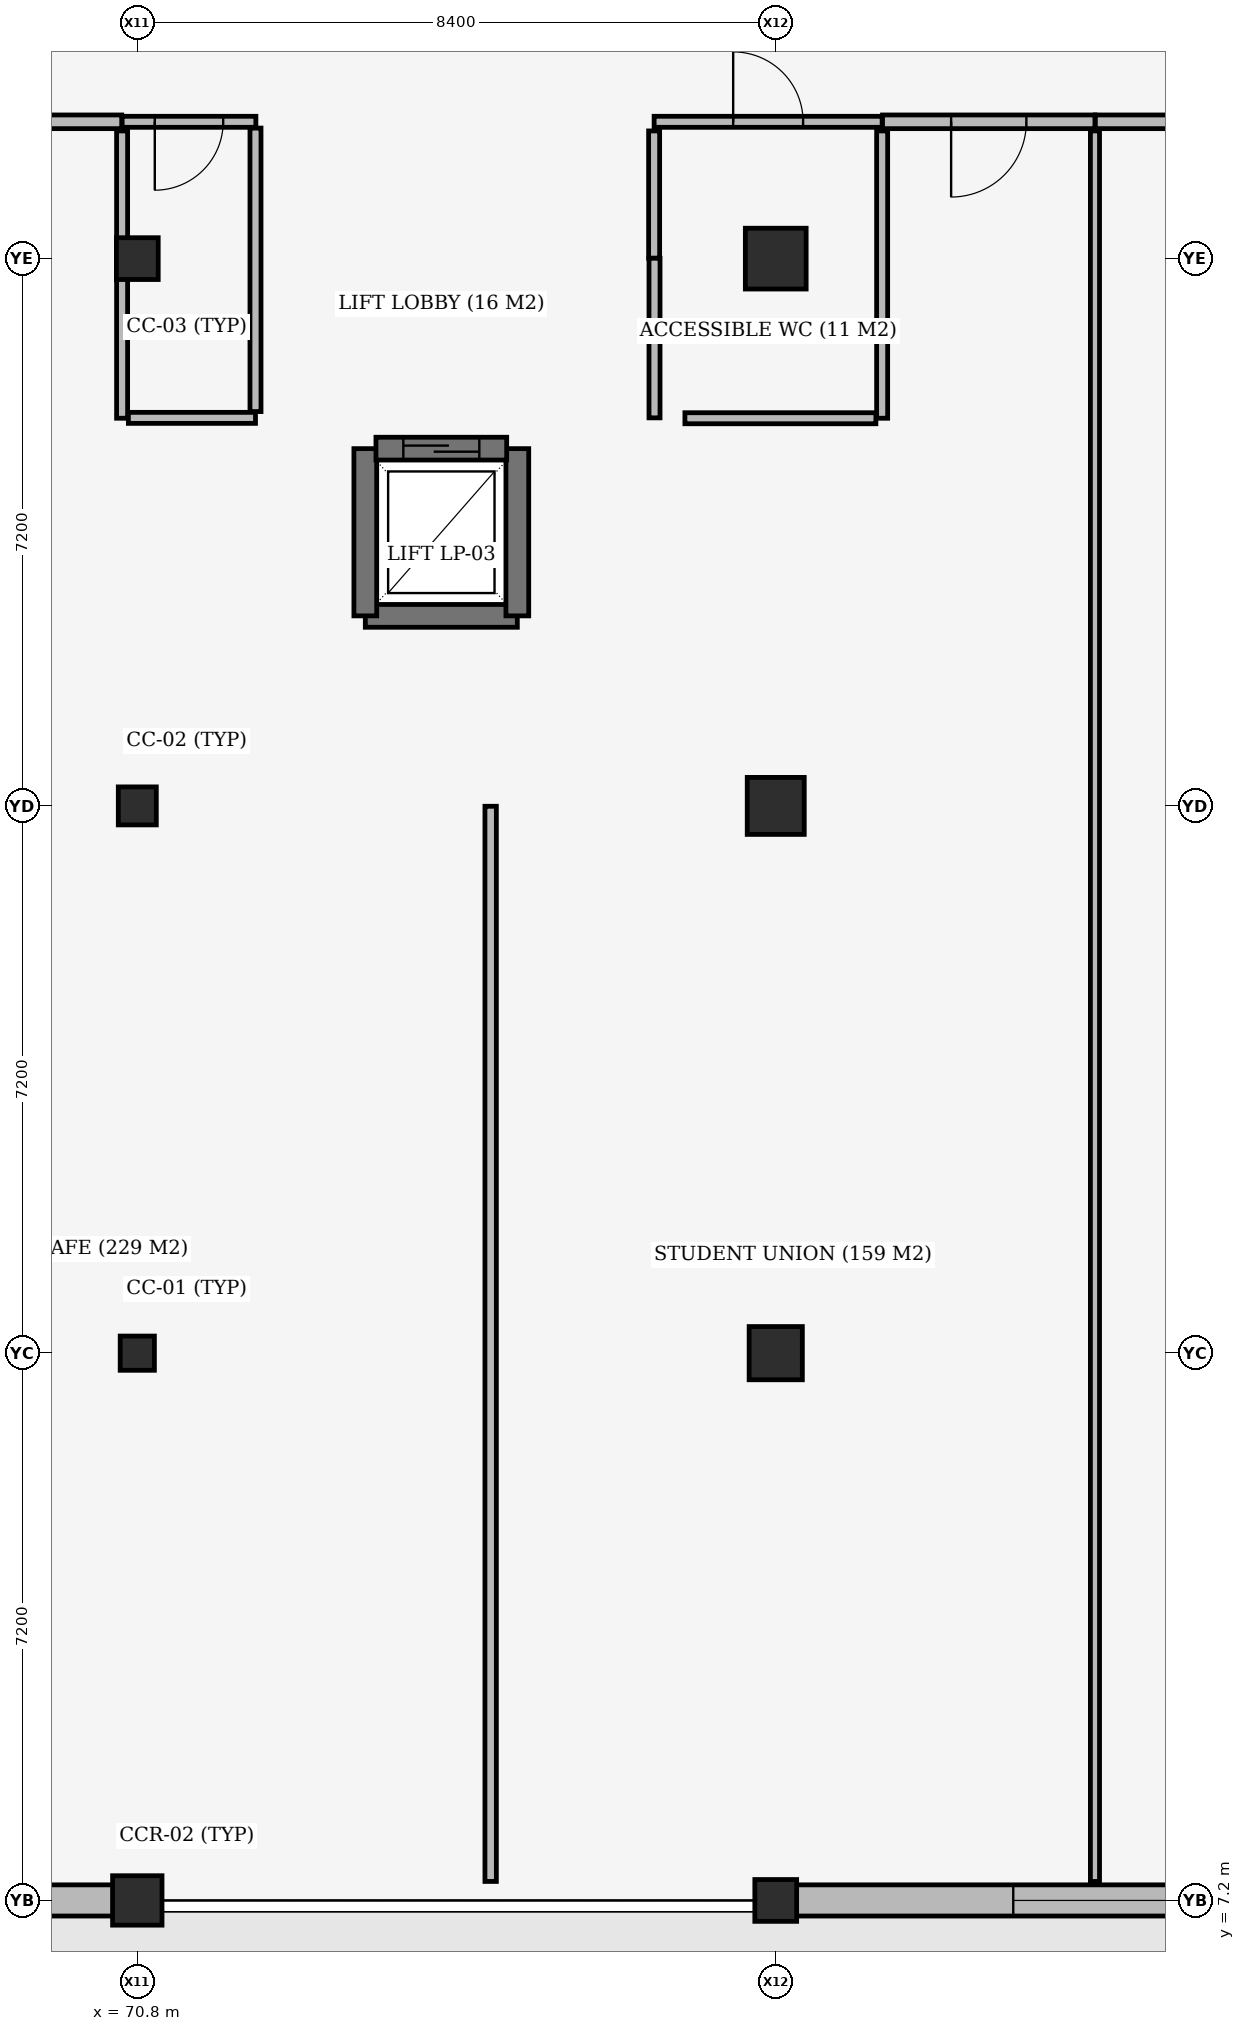
"""IFC4 building model, lengths in metres.
Left out: names, types, materials, properties, quantities, classifications, styles, units other than length and angle.
Written with IfcOpenShell. Run it as: python <this file> out.ifc"""

import sys

from ifc_helpers import new_model, si_unit, direction, frame, frame_2d, origin, origin_2d, place, context, subcontext, project, spatial, rectangle, circle, extrude, element, fill, save


model = new_model("IFC4")
c1 = context("Model", 3, precision=1e-05, world=origin(), true_north=direction((0.0, 1.0)))
c2 = subcontext(c1, "Body", "Model", "MODEL_VIEW")
j1 = project(units=[si_unit("LENGTHUNIT", "METRE"), si_unit("PLANEANGLEUNIT", "RADIAN")], contexts=[c1])
p1 = place(None, origin())
s1 = spatial("IfcSite", under=j1, at=p1, CompositionType="ELEMENT")
p2 = place(p1, origin())
s2 = spatial("IfcBuilding", under=s1, at=p2, CompositionType="ELEMENT")
p3 = place(p2, origin())
s3 = spatial("IfcBuildingStorey", under=s2, at=p3, CompositionType="ELEMENT", Elevation=0.0)
p4 = place(p3, frame((70.8, 7.2, 0.0), z_axis=(0.0, 0.0, 1.0), x_axis=(1.0, 0.0, 0.0)))
e1 = element("IfcColumn", 1, at=p4, inside=s3, PredefinedType="COLUMN", context=c2, shape_type="SweptSolid", body=[
    extrude(circle(Radius=0.325, at=origin_2d()), origin(), (0.0, 0.0, 1.0), 5.1),
])
p5 = place(p3, frame((70.8, 14.4, 0.0), z_axis=(0.0, 0.0, 1.0), x_axis=(1.0, 0.0, 0.0)))
e2 = element("IfcColumn", 2, at=p5, inside=s3, PredefinedType="COLUMN", context=c2, shape_type="SweptSolid", body=[
    extrude(rectangle(XDim=0.45, YDim=0.45, at=origin_2d()), origin(), (0.0, 0.0, 1.0), 5.1),
])
p6 = place(p3, frame((70.8, 21.6, 0.0), z_axis=(0.0, 0.0, 1.0), x_axis=(1.0, 0.0, 0.0)))
e3 = element("IfcColumn", 3, at=p6, inside=s3, PredefinedType="COLUMN", context=c2, shape_type="SweptSolid", body=[
    extrude(rectangle(XDim=0.5, YDim=0.5, at=origin_2d()), origin(), (0.0, 0.0, 1.0), 5.1),
])
p7 = place(p3, frame((70.8, 28.8, 0.0), z_axis=(0.0, 0.0, 1.0), x_axis=(1.0, 0.0, 0.0)))
e4 = element("IfcColumn", 4, at=p7, inside=s3, PredefinedType="COLUMN", context=c2, shape_type="SweptSolid", body=[
    extrude(rectangle(XDim=0.55, YDim=0.55, at=origin_2d()), origin(), (0.0, 0.0, 1.0), 5.1),
])
p8 = place(p3, frame((79.2, 7.2, 0.0), z_axis=(0.0, 0.0, 1.0), x_axis=(1.0, 0.0, 0.0)))
e5 = element("IfcColumn", 5, at=p8, inside=s3, PredefinedType="COLUMN", context=c2, shape_type="SweptSolid", body=[
    extrude(circle(Radius=0.275, at=origin_2d()), origin(), (0.0, 0.0, 1.0), 5.1),
])
p9 = place(p3, frame((79.2, 14.4, 0.0), z_axis=(0.0, 0.0, 1.0), x_axis=(1.0, 0.0, 0.0)))
e6 = element("IfcColumn", 6, at=p9, inside=s3, PredefinedType="COLUMN", context=c2, shape_type="SweptSolid", body=[
    extrude(rectangle(XDim=0.7, YDim=0.7, at=origin_2d()), origin(), (0.0, 0.0, 1.0), 5.1),
])
p10 = place(p3, frame((79.2, 21.6, 0.0), z_axis=(0.0, 0.0, 1.0), x_axis=(1.0, 0.0, 0.0)))
e7 = element("IfcColumn", 7, at=p10, inside=s3, PredefinedType="COLUMN", context=c2, shape_type="SweptSolid", body=[
    extrude(rectangle(XDim=0.75, YDim=0.75, at=origin_2d()), origin(), (0.0, 0.0, 1.0), 5.1),
])
p11 = place(p3, frame((79.2, 28.8, 0.0), z_axis=(0.0, 0.0, 1.0), x_axis=(1.0, 0.0, 0.0)))
e8 = element("IfcColumn", 8, at=p11, inside=s3, PredefinedType="COLUMN", context=c2, shape_type="SweptSolid", body=[
    extrude(rectangle(XDim=0.8, YDim=0.8, at=origin_2d()), origin(), (0.0, 0.0, 1.0), 5.1),
])
p12 = place(p3, frame((73.8, 24.1, 0.0), z_axis=(0.0, 0.0, 1.0), x_axis=(1.0, 0.0, 0.0)))
e9 = element("IfcWall", 9, at=p12, inside=s3, PredefinedType="SHEAR", context=c2, shape_type="SweptSolid", body=[
    extrude(rectangle(XDim=2.0, YDim=0.3, at=frame_2d((1.0, 0.0))), origin(), (0.0, 0.0, 1.0), 5.1),
])
for number, where, z_axis, x_axis in (
    (10, (73.8, 26.3, 0.0), (0.0, 0.0, 1.0), (0.0, -1.0, 0.0)),
    (11, (75.8, 24.1, 0.0), (0.0, 0.0, 1.0), (0.0, 1.0, 0.0)),
):
    element("IfcWall", number, at=place(p3, frame(where, z_axis=z_axis, x_axis=x_axis)), inside=s3, PredefinedType="SHEAR", context=c2, shape_type="SweptSolid", body=[
        extrude(rectangle(XDim=2.2, YDim=0.3, at=frame_2d((1.1, 0.0))), origin(), (0.0, 0.0, 1.0), 5.1),
    ])
p13 = place(p3, frame((70.483, 7.2, 0.0), z_axis=(0.0, 0.0, 1.0), x_axis=(-1.0, 0.0, 0.0)))
e12 = element("IfcWall", 12, at=p13, inside=s3, PredefinedType="STANDARD", context=c2, shape_type="SweptSolid", body=[
    extrude(rectangle(XDim=7.816, YDim=0.41, at=frame_2d((3.908, 0.0))), origin(), (0.0, 0.0, 1.0), 4.4),
])
p14 = place(p13, frame((2.808, 0.0, 0.0)))
e13 = element("IfcOpeningElement", 13, at=p14, cuts=e12, PredefinedType="OPENING", context=c2, shape_type="SweptSolid", body=[
    extrude(rectangle(XDim=2.2, YDim=2.5, at=frame_2d((1.1, 1.25))), frame((0.0, 0.215, 0.0), z_axis=(0.0, -1.0, 0.0), x_axis=(1.0, 0.0, 0.0)), (0.0, 0.0, 1.0), 0.43),
])
p15 = place(p3, frame((87.283, 7.2, 0.0), z_axis=(0.0, 0.0, 1.0), x_axis=(-1.0, 0.0, 0.0)))
e14 = element("IfcWall", 14, at=p15, inside=s3, PredefinedType="STANDARD", context=c2, shape_type="SweptSolid", body=[
    extrude(rectangle(XDim=7.816, YDim=0.41, at=frame_2d((3.908, 0.0))), origin(), (0.0, 0.0, 1.0), 4.3),
])
p16 = place(p15, frame((2.858, 0.0, 0.8)))
e15 = element("IfcOpeningElement", 15, at=p16, cuts=e14, PredefinedType="OPENING", context=c2, shape_type="SweptSolid", body=[
    extrude(rectangle(XDim=2.1, YDim=3.0, at=frame_2d((1.05, 1.5))), frame((0.0, 0.215, 0.0), z_axis=(0.0, -1.0, 0.0), x_axis=(1.0, 0.0, 0.0)), (0.0, 0.0, 1.0), 0.43),
])
p17 = place(p3, frame((73.94, 26.3, 0.0), z_axis=(0.0, 0.0, 1.0), x_axis=(1.0, 0.0, 0.0)))
e16 = element("IfcWall", 16, at=p17, inside=s3, PredefinedType="SHEAR", context=c2, shape_type="SweptSolid", body=[
    extrude(rectangle(XDim=1.72, YDim=0.3, at=frame_2d((0.86, 0.0))), origin(), (0.0, 0.0, 1.0), 5.1),
])
p18 = place(p17, frame((0.36, 0.0, 0.0)))
e17 = element("IfcOpeningElement", 17, at=p18, cuts=e16, PredefinedType="OPENING", context=c2, shape_type="SweptSolid", body=[
    extrude(rectangle(XDim=1.0, YDim=2.1, at=frame_2d((0.5, 1.05))), frame((0.0, 0.16, 0.0), z_axis=(0.0, -1.0, 0.0), x_axis=(1.0, 0.0, 0.0)), (0.0, 0.0, 1.0), 0.32),
])
p19 = place(p3, frame((70.6, 30.6, 0.0), z_axis=(0.0, 0.0, 1.0), x_axis=(1.0, 0.0, 0.0)))
e18 = element("IfcWall", 18, at=p19, inside=s3, PredefinedType="PLUMBINGWALL", context=c2, shape_type="SweptSolid", body=[
    extrude(rectangle(XDim=1.76, YDim=0.145, at=frame_2d((0.88, 0.0))), origin(), (0.0, 0.0, 1.0), 4.5),
])
p20 = place(p19, frame((0.43, 0.0, 0.0)))
e19 = element("IfcOpeningElement", 19, at=p20, cuts=e18, PredefinedType="OPENING", context=c2, shape_type="SweptSolid", body=[
    extrude(rectangle(XDim=0.9, YDim=2.1, at=frame_2d((0.45, 1.05))), frame((0.0, 0.083, 0.0), z_axis=(0.0, -1.0, 0.0), x_axis=(1.0, 0.0, 0.0)), (0.0, 0.0, 1.0), 0.165),
])
p21 = place(p3, frame((70.6, 26.7, 0.0), z_axis=(0.0, 0.0, 1.0), x_axis=(0.0, 1.0, 0.0)))
e20 = element("IfcWall", 20, at=p21, inside=s3, PredefinedType="PLUMBINGWALL", context=c2, shape_type="SweptSolid", body=[
    extrude(rectangle(XDim=3.78, YDim=0.145, at=frame_2d((1.89, 0.0))), origin(), (0.0, 0.0, 1.0), 4.3),
])
p22 = place(p3, frame((77.6, 30.6, 0.0), z_axis=(0.0, 0.0, 1.0), x_axis=(1.0, 0.0, 0.0)))
e21 = element("IfcWall", 21, at=p22, inside=s3, PredefinedType="PLUMBINGWALL", context=c2, shape_type="SweptSolid", body=[
    extrude(rectangle(XDim=3.0, YDim=0.145, at=frame_2d((1.5, 0.0))), origin(), (0.0, 0.0, 1.0), 4.3),
])
p23 = place(p22, frame((1.04, 0.0, 0.0)))
e22 = element("IfcOpeningElement", 22, at=p23, cuts=e21, PredefinedType="OPENING", context=c2, shape_type="SweptSolid", body=[
    extrude(rectangle(XDim=0.92, YDim=2.1, at=frame_2d((0.46, 1.05))), frame((0.0, 0.083, 0.0), z_axis=(0.0, -1.0, 0.0), x_axis=(1.0, 0.0, 0.0)), (0.0, 0.0, 1.0), 0.165),
])
p24 = place(p3, frame((77.6, 28.805, 0.0), z_axis=(0.0, 0.0, 1.0), x_axis=(0.0, 1.0, 0.0)))
e23 = element("IfcWall", 23, at=p24, inside=s3, PredefinedType="PLUMBINGWALL", context=c2, shape_type="SweptSolid", body=[
    extrude(rectangle(XDim=1.675, YDim=0.145, at=frame_2d((0.837, 0.0))), origin(), (0.0, 0.0, 1.0), 4.35),
])
p25 = place(p3, frame((80.6, 26.7, 0.0), z_axis=(0.0, 0.0, 1.0), x_axis=(0.0, 1.0, 0.0)))
e24 = element("IfcWall", 24, at=p25, inside=s3, PredefinedType="PLUMBINGWALL", context=c2, shape_type="SweptSolid", body=[
    extrude(rectangle(XDim=3.78, YDim=0.145, at=frame_2d((1.89, 0.0))), origin(), (0.0, 0.0, 1.0), 4.3),
])
p26 = place(p3, frame((78.005, 26.7, 0.0), z_axis=(0.0, 0.0, 1.0), x_axis=(1.0, 0.0, 0.0)))
e25 = element("IfcWall", 25, at=p26, inside=s3, PredefinedType="PLUMBINGWALL", context=c2, shape_type="SweptSolid", body=[
    extrude(rectangle(XDim=2.513, YDim=0.145, at=frame_2d((1.256, 0.0))), origin(), (0.0, 0.0, 1.0), 4.35),
])
p27 = place(p3, frame((64.005, 30.6, 0.0), z_axis=(0.0, 0.0, 1.0), x_axis=(1.0, 0.0, 0.0)))
e26 = element("IfcWall", 26, at=p27, inside=s3, PredefinedType="PARTITIONING", context=c2, shape_type="SweptSolid", body=[
    extrude(rectangle(XDim=6.59, YDim=0.18, at=frame_2d((3.295, 0.0))), origin(), (0.0, 0.0, 1.0), 4.65),
])
p28 = place(p27, frame((2.805, 0.0, 0.0)))
e27 = element("IfcOpeningElement", 27, at=p28, cuts=e26, PredefinedType="OPENING", context=c2, shape_type="SweptSolid", body=[
    extrude(rectangle(XDim=0.98, YDim=2.18, at=frame_2d((0.49, 1.09))), frame((0.0, 0.1, 0.0), z_axis=(0.0, -1.0, 0.0), x_axis=(1.0, 0.0, 0.0)), (0.0, 0.0, 1.0), 0.2),
])
p29 = place(p3, frame((75.449, 7.45, 0.0), z_axis=(0.0, 0.0, 1.0), x_axis=(0.0, 1.0, 0.0)))
e28 = element("IfcWall", 28, at=p29, inside=s3, PredefinedType="PARTITIONING", context=c2, shape_type="SweptSolid", body=[
    extrude(rectangle(XDim=14.145, YDim=0.15, at=frame_2d((7.073, 0.0))), origin(), (0.0, 0.0, 1.0), 4.45),
])
p30 = place(p3, frame((80.605, 30.6, 0.0), z_axis=(0.0, 0.0, 1.0), x_axis=(1.0, 0.0, 0.0)))
e29 = element("IfcWall", 29, at=p30, inside=s3, PredefinedType="PARTITIONING", context=c2, shape_type="SweptSolid", body=[
    extrude(rectangle(XDim=2.795, YDim=0.18, at=frame_2d((1.397, 0.0))), origin(), (0.0, 0.0, 1.0), 4.65),
])
p31 = place(p30, frame((0.903, 0.0, 0.0)))
e30 = element("IfcOpeningElement", 30, at=p31, cuts=e29, PredefinedType="OPENING", context=c2, shape_type="SweptSolid", body=[
    extrude(rectangle(XDim=0.99, YDim=2.18, at=frame_2d((0.495, 1.09))), frame((0.0, 0.1, 0.0), z_axis=(0.0, -1.0, 0.0), x_axis=(1.0, 0.0, 0.0)), (0.0, 0.0, 1.0), 0.2),
])
p32 = place(p3, frame((83.4, 7.45, 0.0), z_axis=(0.0, 0.0, 1.0), x_axis=(0.0, 1.0, 0.0)))
e31 = element("IfcWall", 31, at=p32, inside=s3, PredefinedType="PARTITIONING", context=c2, shape_type="SweptSolid", body=[
    extrude(rectangle(XDim=23.03, YDim=0.12, at=frame_2d((11.515, 0.0))), origin(), (0.0, 0.0, 1.0), 4.3),
])
p33 = place(p3, frame((83.405, 30.6, 0.0), z_axis=(0.0, 0.0, 1.0), x_axis=(1.0, 0.0, 0.0)))
e32 = element("IfcWall", 32, at=p33, inside=s3, PredefinedType="PARTITIONING", context=c2, shape_type="SweptSolid", body=[
    extrude(rectangle(XDim=9.695, YDim=0.18, at=frame_2d((4.848, 0.0))), origin(), (0.0, 0.0, 1.0), 4.35),
])
p34 = place(p33, frame((4.357, 0.0, 0.0)))
e33 = element("IfcOpeningElement", 33, at=p34, cuts=e32, PredefinedType="OPENING", context=c2, shape_type="SweptSolid", body=[
    extrude(rectangle(XDim=0.98, YDim=2.18, at=frame_2d((0.49, 1.09))), frame((0.0, 0.1, 0.0), z_axis=(0.0, -1.0, 0.0), x_axis=(1.0, 0.0, 0.0)), (0.0, 0.0, 1.0), 0.2),
])
p35 = place(p3, frame((70.683, 26.705, 0.0), z_axis=(0.0, 0.0, 1.0), x_axis=(1.0, 0.0, 0.0)))
e34 = element("IfcWall", 34, at=p35, inside=s3, PredefinedType="PLUMBINGWALL", context=c2, shape_type="SweptSolid", body=[
    extrude(rectangle(XDim=1.672, YDim=0.145, at=frame_2d((0.836, 0.0))), origin(), (0.0, 0.0, 1.0), 4.3),
])
p36 = place(p3, frame((72.355, 26.788, 0.0), z_axis=(0.0, 0.0, 1.0), x_axis=(0.0, 1.0, 0.0)))
e35 = element("IfcWall", 35, at=p36, inside=s3, PredefinedType="PLUMBINGWALL", context=c2, shape_type="SweptSolid", body=[
    extrude(rectangle(XDim=3.73, YDim=0.145, at=frame_2d((1.865, 0.0))), origin(), (0.0, 0.0, 1.0), 4.35),
])
p37 = place(p3, frame((77.605, 26.705, 0.0), z_axis=(0.0, 0.0, 1.0), x_axis=(0.0, 1.0, 0.0)))
e36 = element("IfcWall", 36, at=p37, inside=s3, PredefinedType="PLUMBINGWALL", context=c2, shape_type="SweptSolid", body=[
    extrude(rectangle(XDim=2.1, YDim=0.145, at=frame_2d((1.05, 0.0))), origin(), (0.0, 0.0, 1.0), 4.35),
])
p38 = place(p16, origin())
e37 = element("IfcWindow", 37, at=p38, inside=s3, PartitioningType="DOUBLE_PANEL_VERTICAL", PredefinedType="WINDOW", context=c2, shape_type="SweptSolid", body=[
    extrude(rectangle(XDim=2.1, YDim=3.0, at=frame_2d((1.05, 1.5))), frame((0.0, 0.03, 0.0), z_axis=(0.0, -1.0, 0.0), x_axis=(1.0, 0.0, 0.0)), (0.0, 0.0, 1.0), 0.06),
])
fill(e15, e37)
p39 = place(p18, origin())
e38 = element("IfcDoor", 38, at=p39, inside=s3, OperationType="SLIDING_TO_LEFT", PredefinedType="DOOR", context=c2, shape_type="SweptSolid", body=[
    extrude(rectangle(XDim=1.0, YDim=2.1, at=frame_2d((0.5, 1.05))), frame((0.0, 0.025, 0.0), z_axis=(0.0, -1.0, 0.0), x_axis=(1.0, 0.0, 0.0)), (0.0, 0.0, 1.0), 0.05),
])
fill(e17, e38)
p40 = place(p20, origin())
e39 = element("IfcDoor", 39, at=p40, inside=s3, OperationType="SINGLE_SWING_RIGHT", PredefinedType="DOOR", context=c2, shape_type="SweptSolid", body=[
    extrude(rectangle(XDim=0.9, YDim=2.1, at=frame_2d((0.45, 1.05))), frame((0.0, 0.025, 0.0), z_axis=(0.0, -1.0, 0.0), x_axis=(1.0, 0.0, 0.0)), (0.0, 0.0, 1.0), 0.05),
])
fill(e19, e39)
p41 = place(p23, origin())
e40 = element("IfcDoor", 40, at=p41, inside=s3, OperationType="SINGLE_SWING_LEFT", PredefinedType="DOOR", context=c2, shape_type="SweptSolid", body=[
    extrude(rectangle(XDim=0.92, YDim=2.1, at=frame_2d((0.46, 1.05))), frame((0.0, 0.025, 0.0), z_axis=(0.0, -1.0, 0.0), x_axis=(1.0, 0.0, 0.0)), (0.0, 0.0, 1.0), 0.05),
])
fill(e22, e40)
p42 = place(p31, origin())
e41 = element("IfcDoor", 41, at=p42, inside=s3, OperationType="SINGLE_SWING_RIGHT", PredefinedType="DOOR", context=c2, shape_type="SweptSolid", body=[
    extrude(rectangle(XDim=0.99, YDim=2.18, at=frame_2d((0.495, 1.09))), frame((0.0, 0.025, 0.0), z_axis=(0.0, -1.0, 0.0), x_axis=(1.0, 0.0, 0.0)), (0.0, 0.0, 1.0), 0.05),
])
fill(e30, e41)
save(model, sys.argv[1])
